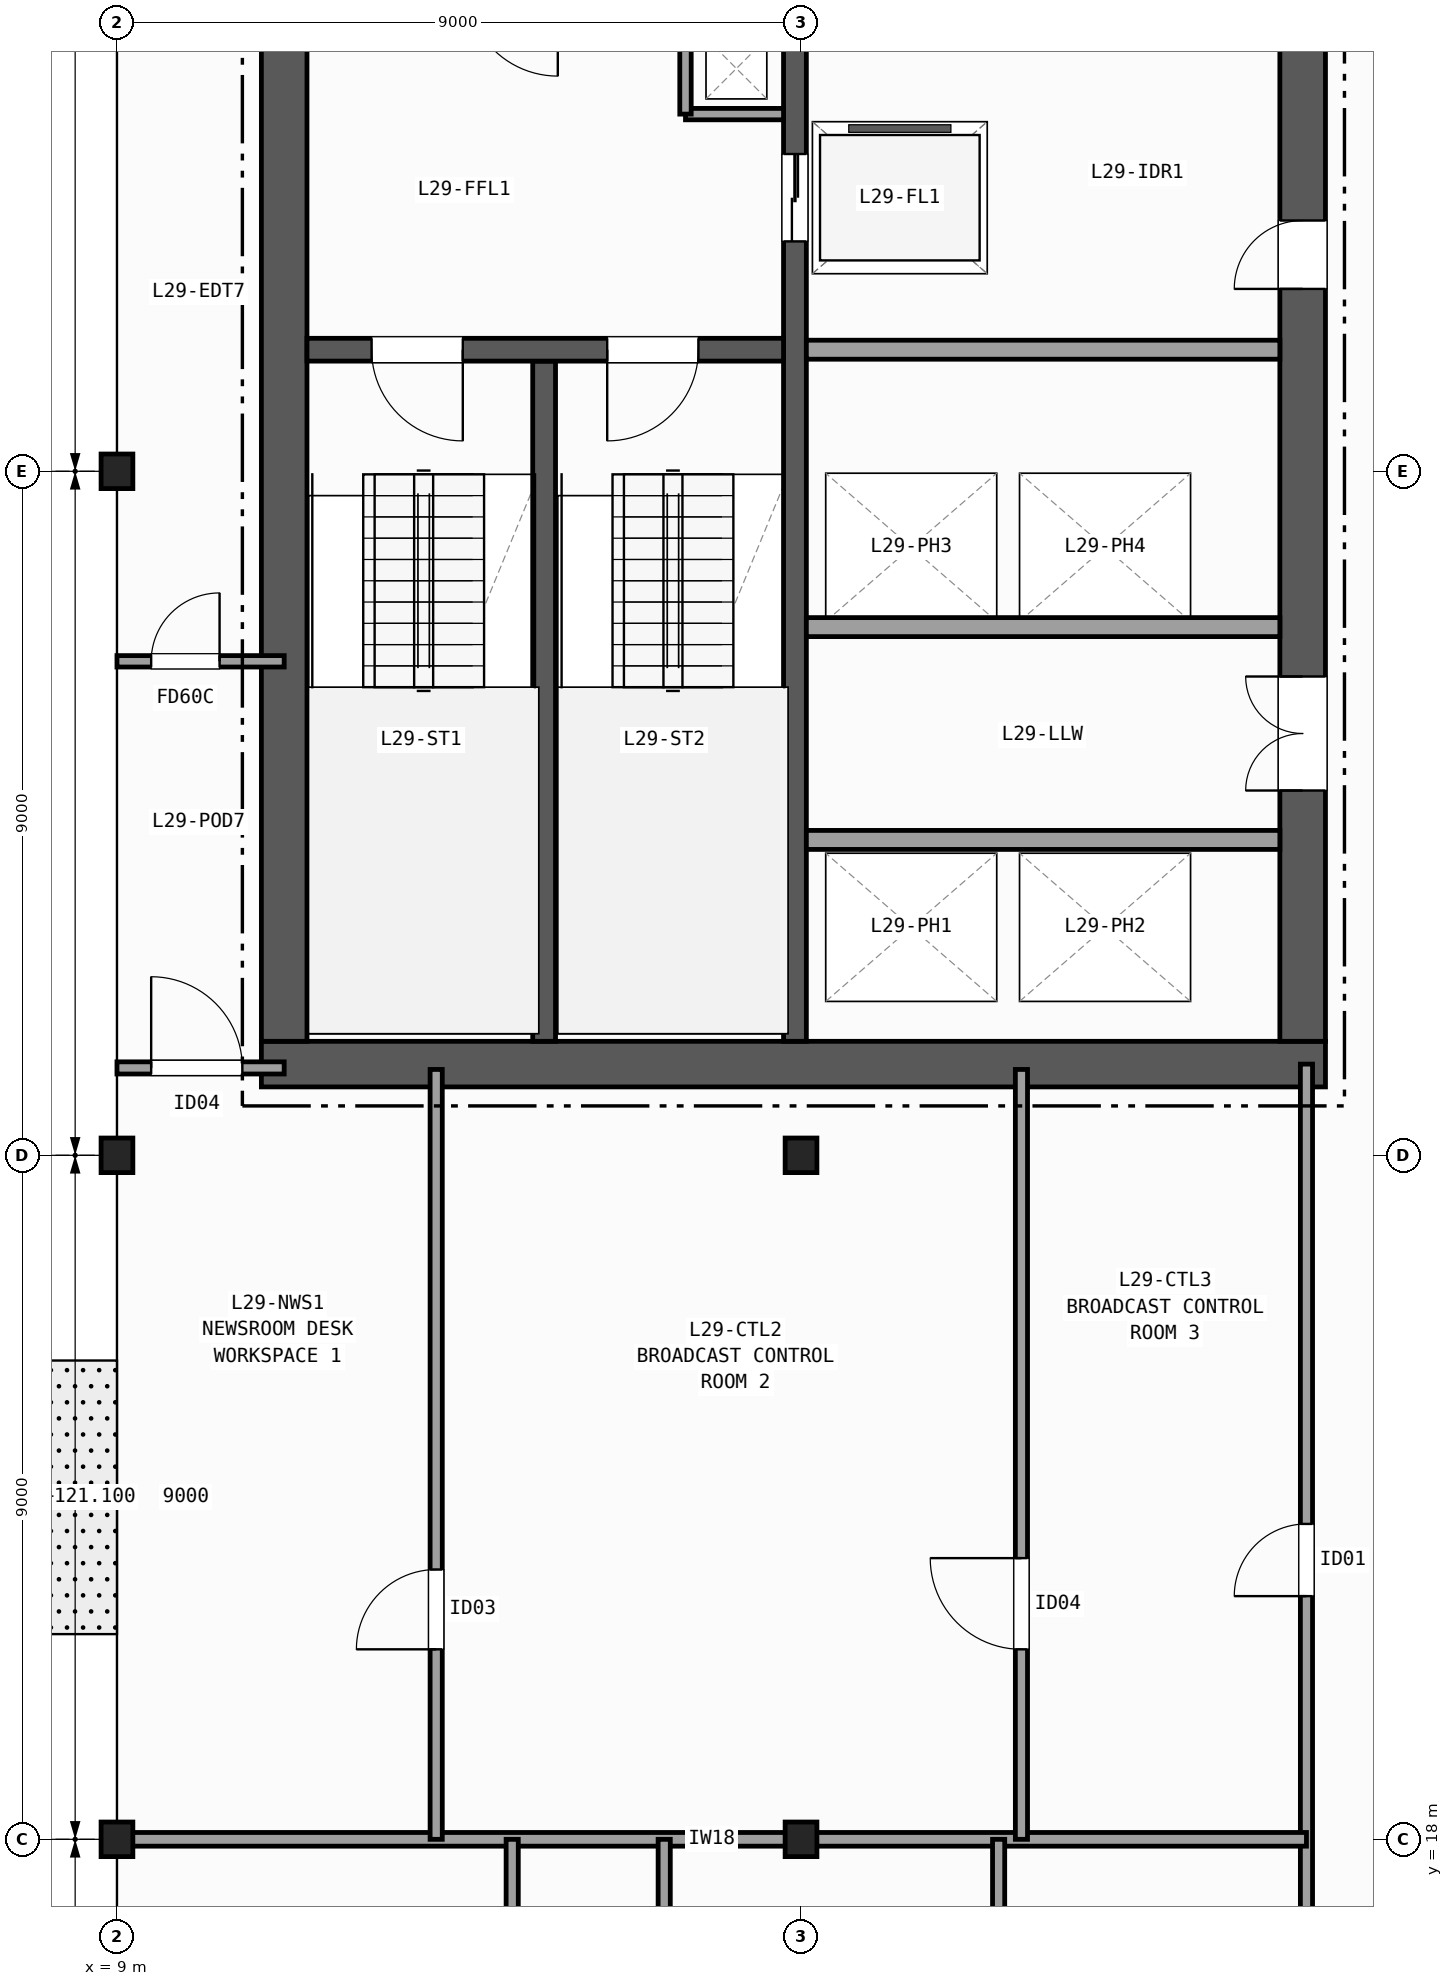
"""IFC4 building model, lengths in metres.
Left out: names, types, materials, properties, quantities, classifications, styles, units other than length and angle.
Written with IfcOpenShell. Run it as: python <this file> out.ifc"""

import sys

from ifc_helpers import new_model, si_unit, direction, frame, frame_2d, origin, origin_2d, place, context, subcontext, project, spatial, rectangle, i_section, extrude, element, fill, save


model = new_model("IFC4")
c1 = context("Model", 3, precision=1e-05, world=origin(), true_north=direction((0.0, 1.0)))
c2 = subcontext(c1, "Body", "Model", "MODEL_VIEW")
j1 = project(units=[si_unit("LENGTHUNIT", "METRE"), si_unit("PLANEANGLEUNIT", "RADIAN")], contexts=[c1])
p1 = place(None, origin())
s1 = spatial("IfcSite", under=j1, at=p1, CompositionType="ELEMENT")
p2 = place(p1, origin())
s2 = spatial("IfcBuilding", under=s1, at=p2, CompositionType="ELEMENT")
p3 = place(p2, frame((0.0, 0.0, 121.1)))
s3 = spatial("IfcBuildingStorey", under=s2, at=p3, CompositionType="ELEMENT", Elevation=121.1)
for number, where, z_axis, x_axis in (
    (1, (9.0, 18.0, 0.0), (0.0, 0.0, 1.0), (1.0, 0.0, 0.0)),
    (2, (9.0, 27.0, 0.0), (0.0, 0.0, 1.0), (1.0, 0.0, 0.0)),
    (3, (9.0, 36.0, 0.0), (0.0, 0.0, 1.0), (1.0, 0.0, 0.0)),
    (4, (18.0, 18.0, 0.0), (0.0, 0.0, 1.0), (1.0, 0.0, 0.0)),
    (5, (18.0, 27.0, 0.0), (0.0, 0.0, 1.0), (1.0, 0.0, 0.0)),
):
    element("IfcColumn", number, at=place(p3, frame(where, z_axis=z_axis, x_axis=x_axis)), inside=s3, PredefinedType="COLUMN", context=c2, shape_type="SweptSolid", body=[
        extrude(i_section(OverallWidth=0.418, OverallDepth=0.455, WebThickness=0.042, FlangeThickness=0.068, FilletRadius=0.015, at=origin_2d()), origin(), (0.0, 0.0, 1.0), 3.7),
    ])
p4 = place(p3, frame((10.9, 28.2, 0.0), z_axis=(0.0, 0.0, 1.0), x_axis=(1.0, 0.0, 0.0)))
e6 = element("IfcWall", 6, at=p4, inside=s3, PredefinedType="SHEAR", context=c2, shape_type="SweptSolid", body=[
    extrude(rectangle(XDim=14.0, YDim=0.6, at=frame_2d((7.0, 0.0))), origin(), (0.0, 0.0, 1.0), 3.42),
])
p5 = place(p3, frame((11.2, 42.1, 0.0), z_axis=(0.0, 0.0, 1.0), x_axis=(0.0, -1.0, 0.0)))
e7 = element("IfcWall", 7, at=p5, inside=s3, PredefinedType="SHEAR", context=c2, shape_type="SweptSolid", body=[
    extrude(rectangle(XDim=13.6, YDim=0.6, at=frame_2d((6.8, 0.0))), origin(), (0.0, 0.0, 1.0), 3.42),
])
p6 = place(p3, frame((24.6, 28.5, 0.0), z_axis=(0.0, 0.0, 1.0), x_axis=(0.0, 1.0, 0.0)))
e8 = element("IfcWall", 8, at=p6, inside=s3, PredefinedType="SHEAR", context=c2, shape_type="SweptSolid", body=[
    extrude(rectangle(XDim=13.6, YDim=0.6, at=frame_2d((6.8, 0.0))), origin(), (0.0, 0.0, 1.0), 3.42),
])
p7 = place(p6, frame((3.3, 0.0, 0.0)))
e9 = element("IfcOpeningElement", 9, at=p7, cuts=e8, PredefinedType="OPENING", context=c2, shape_type="SweptSolid", body=[
    extrude(rectangle(XDim=1.5, YDim=2.2, at=frame_2d((0.75, 1.1))), frame((0.0, 0.31, 0.0), z_axis=(0.0, -1.0, 0.0), x_axis=(1.0, 0.0, 0.0)), (0.0, 0.0, 1.0), 0.62),
])
p8 = place(p6, frame((9.9, 0.0, 0.0)))
e10 = element("IfcOpeningElement", 10, at=p8, cuts=e8, PredefinedType="OPENING", context=c2, shape_type="SweptSolid", body=[
    extrude(rectangle(XDim=0.9, YDim=2.1, at=frame_2d((0.45, 1.05))), frame((0.0, 0.31, 0.0), z_axis=(0.0, -1.0, 0.0), x_axis=(1.0, 0.0, 0.0)), (0.0, 0.0, 1.0), 0.62),
])
p9 = place(p3, frame((14.62, 28.5, 0.0), z_axis=(0.0, 0.0, 1.0), x_axis=(0.0, 1.0, 0.0)))
e11 = element("IfcWall", 11, at=p9, inside=s3, PredefinedType="SHEAR", context=c2, shape_type="SweptSolid", body=[
    extrude(rectangle(XDim=8.95, YDim=0.3, at=frame_2d((4.475, 0.0))), origin(), (0.0, 0.0, 1.0), 3.42),
])
p10 = place(p3, frame((17.92, 42.1, 0.0), z_axis=(0.0, 0.0, 1.0), x_axis=(0.0, -1.0, 0.0)))
e12 = element("IfcWall", 12, at=p10, inside=s3, PredefinedType="SHEAR", context=c2, shape_type="SweptSolid", body=[
    extrude(rectangle(XDim=13.6, YDim=0.3, at=frame_2d((6.8, 0.0))), origin(), (0.0, 0.0, 1.0), 3.42),
])
p11 = place(p10, frame((1.925, 0.0, 0.0)))
e13 = element("IfcOpeningElement", 13, at=p11, cuts=e12, PredefinedType="OPENING", context=c2, shape_type="SweptSolid", body=[
    extrude(rectangle(XDim=1.15, YDim=2.15, at=frame_2d((0.575, 1.075))), frame((0.0, 0.16, 0.0), z_axis=(0.0, -1.0, 0.0), x_axis=(1.0, 0.0, 0.0)), (0.0, 0.0, 1.0), 0.32),
])
p12 = place(p3, frame((17.77, 37.6, 0.0), z_axis=(0.0, 0.0, 1.0), x_axis=(-1.0, 0.0, 0.0)))
e14 = element("IfcWall", 14, at=p12, inside=s3, PredefinedType="SHEAR", context=c2, shape_type="SweptSolid", body=[
    extrude(rectangle(XDim=6.27, YDim=0.3, at=frame_2d((3.135, 0.0))), origin(), (0.0, 0.0, 1.0), 3.42),
])
p13 = place(p12, frame((4.22, 0.0, 0.0)))
e15 = element("IfcOpeningElement", 15, at=p13, cuts=e14, PredefinedType="OPENING", context=c2, shape_type="SweptSolid", body=[
    extrude(rectangle(XDim=1.2, YDim=2.15, at=frame_2d((0.6, 1.075))), frame((0.0, 0.16, 0.0), z_axis=(0.0, -1.0, 0.0), x_axis=(1.0, 0.0, 0.0)), (0.0, 0.0, 1.0), 0.32),
])
p14 = place(p12, frame((1.12, 0.0, 0.0)))
e16 = element("IfcOpeningElement", 16, at=p14, cuts=e14, PredefinedType="OPENING", context=c2, shape_type="SweptSolid", body=[
    extrude(rectangle(XDim=1.2, YDim=2.15, at=frame_2d((0.6, 1.075))), frame((0.0, 0.16, 0.0), z_axis=(0.0, -1.0, 0.0), x_axis=(1.0, 0.0, 0.0)), (0.0, 0.0, 1.0), 0.32),
])
p15 = place(p3, frame((16.48, 40.7, 0.0), z_axis=(0.0, 0.0, 1.0), x_axis=(1.0, 0.0, 0.0)))
e17 = element("IfcWall", 17, at=p15, inside=s3, PredefinedType="PARTITIONING", context=c2, shape_type="SweptSolid", body=[
    extrude(rectangle(XDim=1.29, YDim=0.15, at=frame_2d((0.645, 0.0))), origin(), (0.0, 0.0, 1.0), 3.42),
])
p16 = place(p3, frame((16.48, 40.7, 0.0), z_axis=(0.0, 0.0, 1.0), x_axis=(0.0, 1.0, 0.0)))
e18 = element("IfcWall", 18, at=p16, inside=s3, PredefinedType="PARTITIONING", context=c2, shape_type="SweptSolid", body=[
    extrude(rectangle(XDim=1.4, YDim=0.15, at=frame_2d((0.7, 0.0))), origin(), (0.0, 0.0, 1.0), 3.42),
])
for number, where, z_axis, x_axis in (
    (19, (18.07, 37.6, 0.0), (0.0, 0.0, 1.0), (1.0, 0.0, 0.0)),
    (20, (18.07, 31.15, 0.0), (0.0, 0.0, 1.0), (1.0, 0.0, 0.0)),
    (21, (24.3, 33.95, 0.0), (0.0, 0.0, 1.0), (-1.0, 0.0, 0.0)),
):
    element("IfcWall", number, at=place(p3, frame(where, z_axis=z_axis, x_axis=x_axis)), inside=s3, PredefinedType="PARTITIONING", context=c2, shape_type="SweptSolid", body=[
        extrude(rectangle(XDim=6.23, YDim=0.25, at=frame_2d((3.115, 0.0))), origin(), (0.0, 0.0, 1.0), 3.42),
    ])
p17 = place(p3, frame((9.0, 28.15, 0.0), z_axis=(0.0, 0.0, 1.0), x_axis=(1.0, 0.0, 0.0)))
e22 = element("IfcWall", 22, at=p17, inside=s3, PredefinedType="PARTITIONING", context=c2, shape_type="SweptSolid", body=[
    extrude(rectangle(XDim=2.2, YDim=0.16, at=frame_2d((1.1, 0.0))), origin(), (0.0, 0.0, 1.0), 2.634),
])
p18 = place(p17, frame((0.45, 0.0, 0.0)))
e23 = element("IfcOpeningElement", 23, at=p18, cuts=e22, PredefinedType="OPENING", context=c2, shape_type="SweptSolid", body=[
    extrude(rectangle(XDim=1.2, YDim=2.15, at=frame_2d((0.6, 1.075))), frame((0.0, 0.09, 0.0), z_axis=(0.0, -1.0, 0.0), x_axis=(1.0, 0.0, 0.0)), (0.0, 0.0, 1.0), 0.18),
])
p19 = place(p3, frame((9.0, 33.5, 0.0), z_axis=(0.0, 0.0, 1.0), x_axis=(1.0, 0.0, 0.0)))
e24 = element("IfcWall", 24, at=p19, inside=s3, PredefinedType="PARTITIONING", context=c2, shape_type="SweptSolid", body=[
    extrude(rectangle(XDim=2.2, YDim=0.15, at=frame_2d((1.1, 0.0))), origin(), (0.0, 0.0, 1.0), 2.634),
])
p20 = place(p19, frame((0.45, 0.0, 0.0)))
e25 = element("IfcOpeningElement", 25, at=p20, cuts=e24, PredefinedType="OPENING", context=c2, shape_type="SweptSolid", body=[
    extrude(rectangle(XDim=0.9, YDim=2.1, at=frame_2d((0.45, 1.05))), frame((0.0, 0.085, 0.0), z_axis=(0.0, -1.0, 0.0), x_axis=(1.0, 0.0, 0.0)), (0.0, 0.0, 1.0), 0.17),
])
p21 = place(p3, frame((24.65, 9.0, 0.0), z_axis=(0.0, 0.0, 1.0), x_axis=(0.0, 1.0, 0.0)))
e26 = element("IfcWall", 26, at=p21, inside=s3, PredefinedType="PARTITIONING", context=c2, shape_type="SweptSolid", body=[
    extrude(rectangle(XDim=19.2, YDim=0.16, at=frame_2d((9.6, 0.0))), origin(), (0.0, 0.0, 1.0), 2.634),
])
p22 = place(p21, frame((12.2, 0.0, 0.0)))
e27 = element("IfcOpeningElement", 27, at=p22, cuts=e26, PredefinedType="OPENING", context=c2, shape_type="SweptSolid", body=[
    extrude(rectangle(XDim=0.95, YDim=2.1, at=frame_2d((0.475, 1.05))), frame((0.0, 0.09, 0.0), z_axis=(0.0, -1.0, 0.0), x_axis=(1.0, 0.0, 0.0)), (0.0, 0.0, 1.0), 0.18),
])
p23 = place(p21, frame((4.2, 0.0, 0.0)))
e28 = element("IfcOpeningElement", 28, at=p23, cuts=e26, PredefinedType="OPENING", context=c2, shape_type="SweptSolid", body=[
    extrude(rectangle(XDim=1.0, YDim=2.1, at=frame_2d((0.5, 1.05))), frame((0.0, 0.09, 0.0), z_axis=(0.0, -1.0, 0.0), x_axis=(1.0, 0.0, 0.0)), (0.0, 0.0, 1.0), 0.18),
])
p24 = place(p3, frame((9.0, 18.0, 0.0), z_axis=(0.0, 0.0, 1.0), x_axis=(1.0, 0.0, 0.0)))
e29 = element("IfcWall", 29, at=p24, inside=s3, PredefinedType="PARTITIONING", context=c2, shape_type="SweptSolid", body=[
    extrude(rectangle(XDim=15.65, YDim=0.18, at=frame_2d((7.825, 0.0))), origin(), (0.0, 0.0, 1.0), 2.634),
])
p25 = place(p3, frame((13.2, 18.0, 0.0), z_axis=(0.0, 0.0, 1.0), x_axis=(0.0, 1.0, 0.0)))
e30 = element("IfcWall", 30, at=p25, inside=s3, PredefinedType="PARTITIONING", context=c2, shape_type="SweptSolid", body=[
    extrude(rectangle(XDim=10.13, YDim=0.16, at=frame_2d((5.065, 0.0))), origin(), (0.0, 0.0, 1.0), 2.789),
])
p26 = place(p25, frame((2.5, 0.0, 0.0)))
e31 = element("IfcOpeningElement", 31, at=p26, cuts=e30, PredefinedType="OPENING", context=c2, shape_type="SweptSolid", body=[
    extrude(rectangle(XDim=1.05, YDim=2.15, at=frame_2d((0.525, 1.075))), frame((0.0, 0.09, 0.0), z_axis=(0.0, -1.0, 0.0), x_axis=(1.0, 0.0, 0.0)), (0.0, 0.0, 1.0), 0.18),
])
p27 = place(p3, frame((20.9, 18.0, 0.0), z_axis=(0.0, 0.0, 1.0), x_axis=(0.0, 1.0, 0.0)))
e32 = element("IfcWall", 32, at=p27, inside=s3, PredefinedType="PARTITIONING", context=c2, shape_type="SweptSolid", body=[
    extrude(rectangle(XDim=10.13, YDim=0.16, at=frame_2d((5.065, 0.0))), origin(), (0.0, 0.0, 1.0), 2.789),
])
p28 = place(p27, frame((2.5, 0.0, 0.0)))
e33 = element("IfcOpeningElement", 33, at=p28, cuts=e32, PredefinedType="OPENING", context=c2, shape_type="SweptSolid", body=[
    extrude(rectangle(XDim=1.2, YDim=2.15, at=frame_2d((0.6, 1.075))), frame((0.0, 0.09, 0.0), z_axis=(0.0, -1.0, 0.0), x_axis=(1.0, 0.0, 0.0)), (0.0, 0.0, 1.0), 0.18),
])
p29 = place(p3, frame((14.2, 9.0, 0.0), z_axis=(0.0, 0.0, 1.0), x_axis=(0.0, 1.0, 0.0)))
e34 = element("IfcWall", 34, at=p29, inside=s3, PredefinedType="PARTITIONING", context=c2, shape_type="SweptSolid", body=[
    extrude(rectangle(XDim=9.0, YDim=0.16, at=frame_2d((4.5, 0.0))), origin(), (0.0, 0.0, 1.0), 2.789),
])
p30 = place(p29, frame((3.5, 0.0, 0.0)))
e35 = element("IfcOpeningElement", 35, at=p30, cuts=e34, PredefinedType="OPENING", context=c2, shape_type="SweptSolid", body=[
    extrude(rectangle(XDim=0.86, YDim=2.05, at=frame_2d((0.43, 1.025))), frame((0.0, 0.09, 0.0), z_axis=(0.0, -1.0, 0.0), x_axis=(1.0, 0.0, 0.0)), (0.0, 0.0, 1.0), 0.18),
])
p31 = place(p3, frame((16.2, 9.0, 0.0), z_axis=(0.0, 0.0, 1.0), x_axis=(0.0, 1.0, 0.0)))
e36 = element("IfcWall", 36, at=p31, inside=s3, PredefinedType="PARTITIONING", context=c2, shape_type="SweptSolid", body=[
    extrude(rectangle(XDim=9.0, YDim=0.16, at=frame_2d((4.5, 0.0))), origin(), (0.0, 0.0, 1.0), 2.789),
])
p32 = place(p31, frame((3.5, 0.0, 0.0)))
e37 = element("IfcOpeningElement", 37, at=p32, cuts=e36, PredefinedType="OPENING", context=c2, shape_type="SweptSolid", body=[
    extrude(rectangle(XDim=0.95, YDim=2.1, at=frame_2d((0.475, 1.05))), frame((0.0, 0.09, 0.0), z_axis=(0.0, -1.0, 0.0), x_axis=(1.0, 0.0, 0.0)), (0.0, 0.0, 1.0), 0.18),
])
p33 = place(p3, frame((20.6, 9.0, 0.0), z_axis=(0.0, 0.0, 1.0), x_axis=(0.0, 1.0, 0.0)))
e38 = element("IfcWall", 38, at=p33, inside=s3, PredefinedType="PARTITIONING", context=c2, shape_type="SweptSolid", body=[
    extrude(rectangle(XDim=9.0, YDim=0.16, at=frame_2d((4.5, 0.0))), origin(), (0.0, 0.0, 1.0), 2.634),
])
p34 = place(p33, frame((3.5, 0.0, 0.0)))
e39 = element("IfcOpeningElement", 39, at=p34, cuts=e38, PredefinedType="OPENING", context=c2, shape_type="SweptSolid", body=[
    extrude(rectangle(XDim=1.0, YDim=2.1, at=frame_2d((0.5, 1.05))), frame((0.0, 0.09, 0.0), z_axis=(0.0, -1.0, 0.0), x_axis=(1.0, 0.0, 0.0)), (0.0, 0.0, 1.0), 0.18),
])
p35 = place(p13, origin())
e40 = element("IfcDoor", 40, at=p35, inside=s3, OperationType="SINGLE_SWING_LEFT", PredefinedType="DOOR", context=c2, shape_type="SweptSolid", body=[
    extrude(rectangle(XDim=1.2, YDim=2.15, at=frame_2d((0.6, 1.075))), frame((0.0, 0.025, 0.0), z_axis=(0.0, -1.0, 0.0), x_axis=(1.0, 0.0, 0.0)), (0.0, 0.0, 1.0), 0.05),
])
fill(e15, e40)
p36 = place(p14, origin())
e41 = element("IfcDoor", 41, at=p36, inside=s3, OperationType="SINGLE_SWING_RIGHT", PredefinedType="DOOR", context=c2, shape_type="SweptSolid", body=[
    extrude(rectangle(XDim=1.2, YDim=2.15, at=frame_2d((0.6, 1.075))), frame((0.0, 0.025, 0.0), z_axis=(0.0, -1.0, 0.0), x_axis=(1.0, 0.0, 0.0)), (0.0, 0.0, 1.0), 0.05),
])
fill(e16, e41)
p37 = place(p7, origin())
e42 = element("IfcDoor", 42, at=p37, inside=s3, OperationType="DOUBLE_DOOR_SINGLE_SWING", PredefinedType="DOOR", context=c2, shape_type="SweptSolid", body=[
    extrude(rectangle(XDim=1.5, YDim=2.2, at=frame_2d((0.75, 1.1))), frame((0.0, 0.025, 0.0), z_axis=(0.0, -1.0, 0.0), x_axis=(1.0, 0.0, 0.0)), (0.0, 0.0, 1.0), 0.05),
])
fill(e9, e42)
p38 = place(p8, origin())
e43 = element("IfcDoor", 43, at=p38, inside=s3, OperationType="SINGLE_SWING_LEFT", PredefinedType="DOOR", context=c2, shape_type="SweptSolid", body=[
    extrude(rectangle(XDim=0.9, YDim=2.1, at=frame_2d((0.45, 1.05))), frame((0.0, 0.025, 0.0), z_axis=(0.0, -1.0, 0.0), x_axis=(1.0, 0.0, 0.0)), (0.0, 0.0, 1.0), 0.05),
])
fill(e10, e43)
p39 = place(p11, origin())
e44 = element("IfcDoor", 44, at=p39, inside=s3, OperationType="DOUBLE_DOOR_SLIDING", PredefinedType="DOOR", context=c2, shape_type="SweptSolid", body=[
    extrude(rectangle(XDim=1.15, YDim=2.15, at=frame_2d((0.575, 1.075))), frame((0.0, 0.025, 0.0), z_axis=(0.0, -1.0, 0.0), x_axis=(1.0, 0.0, 0.0)), (0.0, 0.0, 1.0), 0.05),
])
fill(e13, e44)
p40 = place(p18, origin())
e45 = element("IfcDoor", 45, at=p40, inside=s3, OperationType="SINGLE_SWING_LEFT", PredefinedType="DOOR", context=c2, shape_type="SweptSolid", body=[
    extrude(rectangle(XDim=1.2, YDim=2.15, at=frame_2d((0.6, 1.075))), frame((0.0, 0.025, 0.0), z_axis=(0.0, -1.0, 0.0), x_axis=(1.0, 0.0, 0.0)), (0.0, 0.0, 1.0), 0.05),
])
fill(e23, e45)
p41 = place(p20, origin())
e46 = element("IfcDoor", 46, at=p41, inside=s3, OperationType="SINGLE_SWING_RIGHT", PredefinedType="DOOR", context=c2, shape_type="SweptSolid", body=[
    extrude(rectangle(XDim=0.9, YDim=2.1, at=frame_2d((0.45, 1.05))), frame((0.0, 0.025, 0.0), z_axis=(0.0, -1.0, 0.0), x_axis=(1.0, 0.0, 0.0)), (0.0, 0.0, 1.0), 0.05),
])
fill(e25, e46)
p42 = place(p22, origin())
e47 = element("IfcDoor", 47, at=p42, inside=s3, OperationType="SINGLE_SWING_LEFT", PredefinedType="DOOR", context=c2, shape_type="SweptSolid", body=[
    extrude(rectangle(XDim=0.95, YDim=2.1, at=frame_2d((0.475, 1.05))), frame((0.0, 0.025, 0.0), z_axis=(0.0, -1.0, 0.0), x_axis=(1.0, 0.0, 0.0)), (0.0, 0.0, 1.0), 0.05),
])
fill(e27, e47)
p43 = place(p26, origin())
e48 = element("IfcDoor", 48, at=p43, inside=s3, OperationType="SINGLE_SWING_LEFT", PredefinedType="DOOR", context=c2, shape_type="SweptSolid", body=[
    extrude(rectangle(XDim=1.05, YDim=2.15, at=frame_2d((0.525, 1.075))), frame((0.0, 0.025, 0.0), z_axis=(0.0, -1.0, 0.0), x_axis=(1.0, 0.0, 0.0)), (0.0, 0.0, 1.0), 0.05),
])
fill(e31, e48)
p44 = place(p28, origin())
e49 = element("IfcDoor", 49, at=p44, inside=s3, OperationType="SINGLE_SWING_RIGHT", PredefinedType="DOOR", context=c2, shape_type="SweptSolid", body=[
    extrude(rectangle(XDim=1.2, YDim=2.15, at=frame_2d((0.6, 1.075))), frame((0.0, 0.025, 0.0), z_axis=(0.0, -1.0, 0.0), x_axis=(1.0, 0.0, 0.0)), (0.0, 0.0, 1.0), 0.05),
])
fill(e33, e49)
save(model, sys.argv[1])
